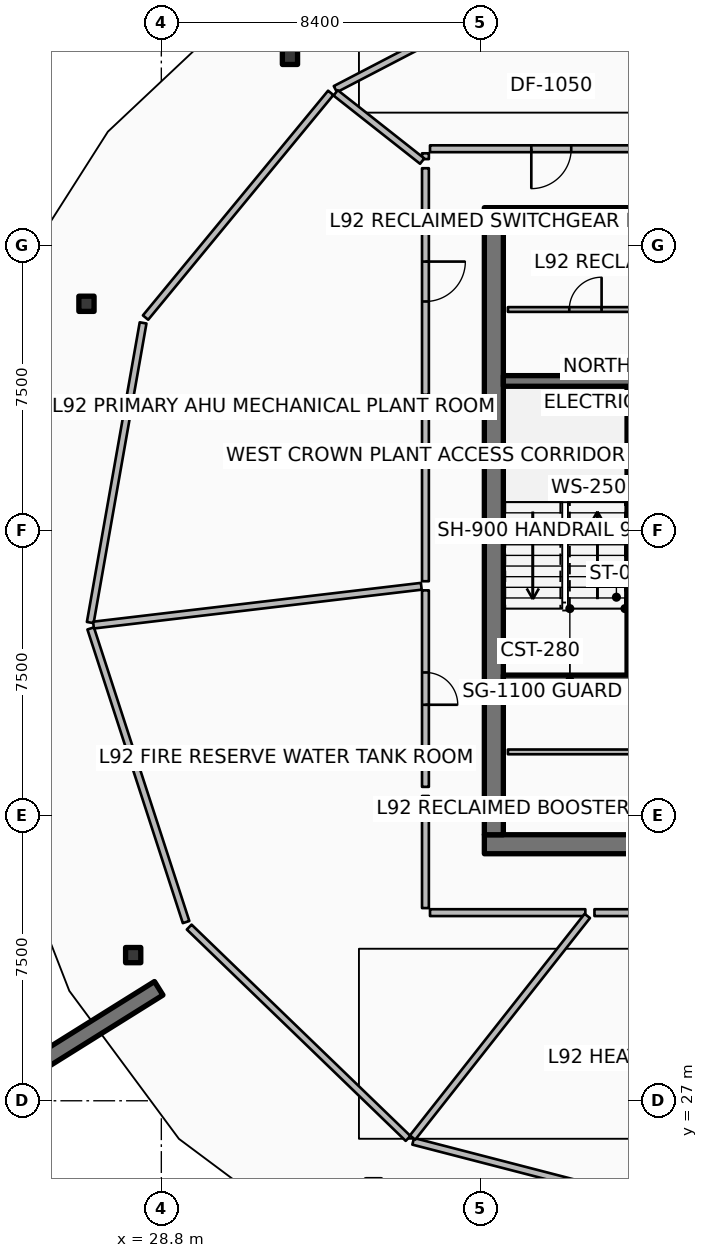
"""IFC4 building model, lengths in metres.
Left out: names, types, materials, properties, quantities, classifications, styles, units other than length and angle.
Written with IfcOpenShell. Run it as: python <this file> out.ifc"""

import sys

from ifc_helpers import new_model, si_unit, direction, frame, frame_2d, origin, origin_2d, place, context, subcontext, project, spatial, rectangle, hollow_rectangle, extrude, element, fill, save


model = new_model("IFC4")
c1 = context("Model", 3, precision=1e-05, world=origin(), true_north=direction((0.0, 1.0)))
c2 = subcontext(c1, "Body", "Model", "MODEL_VIEW")
j1 = project(units=[si_unit("LENGTHUNIT", "METRE"), si_unit("PLANEANGLEUNIT", "RADIAN")], contexts=[c1])
p1 = place(None, origin())
s1 = spatial("IfcSite", under=j1, at=p1, CompositionType="ELEMENT")
p2 = place(p1, origin())
s2 = spatial("IfcBuilding", under=s1, at=p2, CompositionType="ELEMENT")
p3 = place(p2, frame((0.0, 0.0, 366.8)))
s3 = spatial("IfcBuildingStorey", under=s2, at=p3, CompositionType="ELEMENT", Elevation=366.8)
for number, where, z_axis, x_axis in (
    (1, (37.3, 33.75, 0.0), (0.0, 0.0, 1.0), (1.0, 0.0, 0.0)),
    (2, (37.3, 50.25, 0.0), (0.0, 0.0, 1.0), (1.0, 0.0, 0.0)),
):
    element("IfcWall", number, at=place(p3, frame(where, z_axis=z_axis, x_axis=x_axis)), inside=s3, PredefinedType="SHEAR", context=c2, shape_type="SweptSolid", body=[
        extrude(rectangle(XDim=9.6, YDim=0.5, at=frame_2d((4.8, 0.0))), origin(), (0.0, 0.0, 1.0), 3.6),
    ])
p4 = place(p3, frame((37.55, 34.0, 0.0), z_axis=(0.0, 0.0, 1.0), x_axis=(0.0, 1.0, 0.0)))
e3 = element("IfcWall", 3, at=p4, inside=s3, PredefinedType="SHEAR", context=c2, shape_type="SweptSolid", body=[
    extrude(rectangle(XDim=16.0, YDim=0.5, at=frame_2d((8.0, 0.0))), origin(), (0.0, 0.0, 1.0), 3.6),
])
for number, where, z_axis, x_axis in (
    (4, (37.8, 38.06, 0.0), (0.0, 0.0, 1.0), (1.0, 0.0, 0.0)),
    (5, (37.8, 45.94, 0.0), (0.0, 0.0, 1.0), (1.0, 0.0, 0.0)),
):
    element("IfcWall", number, at=place(p3, frame(where, z_axis=z_axis, x_axis=x_axis)), inside=s3, PredefinedType="SHEAR", context=c2, shape_type="SweptSolid", body=[
        extrude(rectangle(XDim=3.5, YDim=0.28, at=frame_2d((1.75, 0.0))), origin(), (0.0, 0.0, 1.0), 3.6),
    ])
p5 = place(p3, frame((28.731, 29.959, 0.0), z_axis=(0.0, 0.0, 1.0), x_axis=(-0.848033572426, -0.529942506352, 0.0)))
e6 = element("IfcWall", 6, at=p5, inside=s3, PredefinedType="SOLIDWALL", context=c2, shape_type="SweptSolid", body=[
    extrude(rectangle(XDim=3.5, YDim=0.42, at=frame_2d((1.75, 0.0))), origin(), (0.0, 0.0, 1.0), 3.6),
])
for number, where, z_axis, x_axis in (
    (7, (32.185, 54.468, 0.0), (0.0, 0.0, 1.0), (1.0, 0.0, 0.0)),
    (8, (26.83, 47.97, 0.0), (0.0, 0.0, 1.0), (1.0, 0.0, 0.0)),
    (9, (28.059, 30.833, 0.0), (0.0, 0.0, 1.0), (1.0, 0.0, 0.0)),
):
    element("IfcColumn", number, at=place(p3, frame(where, z_axis=z_axis, x_axis=x_axis)), inside=s3, PredefinedType="COLUMN", context=c2, shape_type="SweptSolid", body=[
        extrude(hollow_rectangle(XDim=0.4, YDim=0.4, WallThickness=0.02, InnerFilletRadius=0.02, OuterFilletRadius=0.04, at=origin_2d()), origin(), (0.0, 0.0, 1.0), 3.32),
    ])
p6 = place(p3, frame((41.18, 38.22, 0.0), z_axis=(0.0, 0.0, 1.0), x_axis=(0.0, 1.0, 0.0)))
e10 = element("IfcWall", 10, at=p6, inside=s3, PredefinedType="SOLIDWALL", context=c2, shape_type="SweptSolid", body=[
    extrude(rectangle(XDim=7.56, YDim=0.25, at=frame_2d((3.78, 0.0))), origin(), (0.0, 0.0, 1.0), 3.32),
])
p7 = place(p6, frame((0.3, 0.0, 0.0)))
e11 = element("IfcOpeningElement", 11, at=p7, cuts=e10, PredefinedType="OPENING", context=c2, shape_type="SweptSolid", body=[
    extrude(rectangle(XDim=1.55, YDim=2.15, at=frame_2d((0.775, 1.075))), frame((0.0, 0.135, 0.0), z_axis=(0.0, -1.0, 0.0), x_axis=(1.0, 0.0, 0.0)), (0.0, 0.0, 1.0), 0.27),
])
p8 = place(p3, frame((37.92, 36.18, 0.0), z_axis=(0.0, 0.0, 1.0), x_axis=(1.0, 0.0, 0.0)))
e12 = element("IfcWall", 12, at=p8, inside=s3, PredefinedType="PARTITIONING", context=c2, shape_type="SweptSolid", body=[
    extrude(rectangle(XDim=8.8, YDim=0.125, at=frame_2d((4.4, 0.0))), origin(), (0.0, 0.0, 1.0), 2.76),
])
p9 = place(p8, frame((3.975, 0.0, 0.0)))
e13 = element("IfcOpeningElement", 13, at=p9, cuts=e12, PredefinedType="OPENING", context=c2, shape_type="SweptSolid", body=[
    extrude(rectangle(XDim=0.85, YDim=2.06, at=frame_2d((0.425, 1.03))), frame((0.0, 0.073, 0.0), z_axis=(0.0, -1.0, 0.0), x_axis=(1.0, 0.0, 0.0)), (0.0, 0.0, 1.0), 0.145),
])
p10 = place(p3, frame((37.92, 47.82, 0.0), z_axis=(0.0, 0.0, 1.0), x_axis=(1.0, 0.0, 0.0)))
e14 = element("IfcWall", 14, at=p10, inside=s3, PredefinedType="PARTITIONING", context=c2, shape_type="SweptSolid", body=[
    extrude(rectangle(XDim=4.08, YDim=0.125, at=frame_2d((2.04, 0.0))), origin(), (0.0, 0.0, 1.0), 2.76),
])
p11 = place(p10, frame((1.615, 0.0, 0.0)))
e15 = element("IfcOpeningElement", 15, at=p11, cuts=e14, PredefinedType="OPENING", context=c2, shape_type="SweptSolid", body=[
    extrude(rectangle(XDim=0.85, YDim=2.06, at=frame_2d((0.425, 1.03))), frame((0.0, 0.073, 0.0), z_axis=(0.0, -1.0, 0.0), x_axis=(1.0, 0.0, 0.0)), (0.0, 0.0, 1.0), 0.145),
])
p12 = place(p3, frame((39.59, 56.853, 0.0), z_axis=(0.0, 0.0, 1.0), x_axis=(-0.886949494865, -0.461866423935, 0.0)))
e16 = element("IfcWall", 16, at=p12, inside=s3, PredefinedType="PARTITIONING", context=c2, shape_type="SweptSolid", body=[
    extrude(rectangle(XDim=7.002, YDim=0.18, at=frame_2d((3.501, 0.0))), origin(), (0.0, 0.0, 1.0), 2.76),
])
p13 = place(p3, frame((33.258, 53.52, 0.0), z_axis=(0.0, 0.0, 1.0), x_axis=(-0.636018833443, -0.771673534278, 0.0)))
e17 = element("IfcWall", 17, at=p13, inside=s3, PredefinedType="PARTITIONING", context=c2, shape_type="SweptSolid", body=[
    extrude(rectangle(XDim=7.661, YDim=0.18, at=frame_2d((3.831, 0.0))), origin(), (0.0, 0.0, 1.0), 2.76),
])
p14 = place(p3, frame((28.32, 47.468, 0.0), z_axis=(0.0, 0.0, 1.0), x_axis=(-0.173668776466, -0.984804120666, 0.0)))
e18 = element("IfcWall", 18, at=p14, inside=s3, PredefinedType="PARTITIONING", context=c2, shape_type="SweptSolid", body=[
    extrude(rectangle(XDim=8.006, YDim=0.18, at=frame_2d((4.003, 0.0))), origin(), (0.0, 0.0, 1.0), 2.76),
])
p15 = place(p3, frame((26.941, 39.428, 0.0), z_axis=(0.0, 0.0, 1.0), x_axis=(0.309024234991, -0.951054163646, 0.0)))
e19 = element("IfcWall", 19, at=p15, inside=s3, PredefinedType="PARTITIONING", context=c2, shape_type="SweptSolid", body=[
    extrude(rectangle(XDim=8.124, YDim=0.18, at=frame_2d((4.062, 0.0))), origin(), (0.0, 0.0, 1.0), 2.76),
])
p16 = place(p3, frame((29.533, 31.57, 0.0), z_axis=(0.0, 0.0, 1.0), x_axis=(0.719364153135, -0.694633151516, 0.0)))
e20 = element("IfcWall", 20, at=p16, inside=s3, PredefinedType="PARTITIONING", context=c2, shape_type="SweptSolid", body=[
    extrude(rectangle(XDim=8.006, YDim=0.18, at=frame_2d((4.003, 0.0))), origin(), (0.0, 0.0, 1.0), 2.76),
])
p17 = place(p3, frame((35.427, 25.934, 0.0), z_axis=(0.0, 0.0, 1.0), x_axis=(0.968117205342, -0.250497658115, 0.0)))
e21 = element("IfcWall", 21, at=p17, inside=s3, PredefinedType="PARTITIONING", context=c2, shape_type="SweptSolid", body=[
    extrude(rectangle(XDim=7.662, YDim=0.18, at=frame_2d((3.831, 0.0))), origin(), (0.0, 0.0, 1.0), 2.76),
])
p18 = place(p3, frame((42.252, 52.05, 0.0), z_axis=(0.0, 0.0, 1.0), x_axis=(-1.0, 0.0, 0.0)))
e22 = element("IfcWall", 22, at=p18, inside=s3, PredefinedType="PARTITIONING", context=c2, shape_type="SweptSolid", body=[
    extrude(rectangle(XDim=6.382, YDim=0.18, at=frame_2d((3.191, 0.0))), origin(), (0.0, 0.0, 1.0), 2.76),
])
p19 = place(p18, frame((2.666, 0.0, 0.0)))
e23 = element("IfcOpeningElement", 23, at=p19, cuts=e22, PredefinedType="OPENING", context=c2, shape_type="SweptSolid", body=[
    extrude(rectangle(XDim=1.05, YDim=2.1, at=frame_2d((0.525, 1.05))), frame((0.0, 0.1, 0.0), z_axis=(0.0, -1.0, 0.0), x_axis=(1.0, 0.0, 0.0)), (0.0, 0.0, 1.0), 0.2),
])
p20 = place(p3, frame((35.75, 51.93, 0.0), z_axis=(0.0, 0.0, 1.0), x_axis=(0.0, -1.0, 0.0)))
e24 = element("IfcWall", 24, at=p20, inside=s3, PredefinedType="PARTITIONING", context=c2, shape_type="SweptSolid", body=[
    extrude(rectangle(XDim=0.153, YDim=0.18, at=frame_2d((0.076, 0.0))), origin(), (0.0, 0.0, 1.0), 2.76),
])
p21 = place(p3, frame((35.664, 51.725, 0.0), z_axis=(0.0, 0.0, 1.0), x_axis=(-0.78528570066, 0.619133562601, 0.0)))
e25 = element("IfcWall", 25, at=p21, inside=s3, PredefinedType="PARTITIONING", context=c2, shape_type="SweptSolid", body=[
    extrude(rectangle(XDim=2.899, YDim=0.18, at=frame_2d((1.45, 0.0))), origin(), (0.0, 0.0, 1.0), 2.76),
])
p22 = place(p3, frame((35.75, 51.537, 0.0), z_axis=(0.0, 0.0, 1.0), x_axis=(0.0, -1.0, 0.0)))
e26 = element("IfcWall", 26, at=p22, inside=s3, PredefinedType="PARTITIONING", context=c2, shape_type="SweptSolid", body=[
    extrude(rectangle(XDim=5.962, YDim=0.18, at=frame_2d((2.981, 0.0))), origin(), (0.0, 0.0, 1.0), 2.76),
])
p23 = place(p22, frame((2.456, 0.0, 0.0)))
e27 = element("IfcOpeningElement", 27, at=p23, cuts=e26, PredefinedType="OPENING", context=c2, shape_type="SweptSolid", body=[
    extrude(rectangle(XDim=1.05, YDim=2.1, at=frame_2d((0.525, 1.05))), frame((0.0, 0.1, 0.0), z_axis=(0.0, -1.0, 0.0), x_axis=(1.0, 0.0, 0.0)), (0.0, 0.0, 1.0), 0.2),
])
p24 = place(p3, frame((35.75, 45.335, 0.0), z_axis=(0.0, 0.0, 1.0), x_axis=(0.0, -1.0, 0.0)))
e28 = element("IfcWall", 28, at=p24, inside=s3, PredefinedType="PARTITIONING", context=c2, shape_type="SweptSolid", body=[
    extrude(rectangle(XDim=4.665, YDim=0.18, at=frame_2d((2.333, 0.0))), origin(), (0.0, 0.0, 1.0), 2.76),
])
p25 = place(p3, frame((35.641, 40.537, 0.0), z_axis=(0.0, 0.0, 1.0), x_axis=(-0.993070751419, -0.117518010011, 0.0)))
e29 = element("IfcWall", 29, at=p25, inside=s3, PredefinedType="PARTITIONING", context=c2, shape_type="SweptSolid", body=[
    extrude(rectangle(XDim=8.686, YDim=0.18, at=frame_2d((4.343, 0.0))), origin(), (0.0, 0.0, 1.0), 2.76),
])
p26 = place(p3, frame((35.75, 40.43, 0.0), z_axis=(0.0, 0.0, 1.0), x_axis=(0.0, -1.0, 0.0)))
e30 = element("IfcWall", 30, at=p26, inside=s3, PredefinedType="PARTITIONING", context=c2, shape_type="SweptSolid", body=[
    extrude(rectangle(XDim=5.17, YDim=0.18, at=frame_2d((2.585, 0.0))), origin(), (0.0, 0.0, 1.0), 2.76),
])
p27 = place(p26, frame((2.16, 0.0, 0.0)))
e31 = element("IfcOpeningElement", 31, at=p27, cuts=e30, PredefinedType="OPENING", context=c2, shape_type="SweptSolid", body=[
    extrude(rectangle(XDim=0.85, YDim=2.06, at=frame_2d((0.425, 1.03))), frame((0.0, 0.1, 0.0), z_axis=(0.0, -1.0, 0.0), x_axis=(1.0, 0.0, 0.0)), (0.0, 0.0, 1.0), 0.2),
])
p28 = place(p3, frame((35.75, 35.02, 0.0), z_axis=(0.0, 0.0, 1.0), x_axis=(0.0, -1.0, 0.0)))
e32 = element("IfcWall", 32, at=p28, inside=s3, PredefinedType="PARTITIONING", context=c2, shape_type="SweptSolid", body=[
    extrude(rectangle(XDim=2.95, YDim=0.18, at=frame_2d((1.475, 0.0))), origin(), (0.0, 0.0, 1.0), 2.76),
])
p29 = place(p3, frame((35.87, 31.95, 0.0), z_axis=(0.0, 0.0, 1.0), x_axis=(1.0, 0.0, 0.0)))
e33 = element("IfcWall", 33, at=p29, inside=s3, PredefinedType="PARTITIONING", context=c2, shape_type="SweptSolid", body=[
    extrude(rectangle(XDim=4.087, YDim=0.18, at=frame_2d((2.043, 0.0))), origin(), (0.0, 0.0, 1.0), 2.76),
])
p30 = place(p3, frame((40.009, 31.864, 0.0), z_axis=(0.0, 0.0, 1.0), x_axis=(-0.619089811342, -0.785320192974, 0.0)))
e34 = element("IfcWall", 34, at=p30, inside=s3, PredefinedType="PARTITIONING", context=c2, shape_type="SweptSolid", body=[
    extrude(rectangle(XDim=7.426, YDim=0.18, at=frame_2d((3.713, 0.0))), origin(), (0.0, 0.0, 1.0), 2.76),
])
p31 = place(p3, frame((40.197, 31.95, 0.0), z_axis=(0.0, 0.0, 1.0), x_axis=(1.0, 0.0, 0.0)))
e35 = element("IfcWall", 35, at=p31, inside=s3, PredefinedType="PARTITIONING", context=c2, shape_type="SweptSolid", body=[
    extrude(rectangle(XDim=4.848, YDim=0.18, at=frame_2d((2.424, 0.0))), origin(), (0.0, 0.0, 1.0), 2.76),
])
p32 = place(p31, frame((1.899, 0.0, 0.0)))
e36 = element("IfcOpeningElement", 36, at=p32, cuts=e35, PredefinedType="OPENING", context=c2, shape_type="SweptSolid", body=[
    extrude(rectangle(XDim=1.05, YDim=2.1, at=frame_2d((0.525, 1.05))), frame((0.0, 0.1, 0.0), z_axis=(0.0, -1.0, 0.0), x_axis=(1.0, 0.0, 0.0)), (0.0, 0.0, 1.0), 0.2),
])
p33 = place(p11, origin())
e37 = element("IfcDoor", 37, at=p33, inside=s3, OperationType="SINGLE_SWING_RIGHT", PredefinedType="DOOR", context=c2, shape_type="SweptSolid", body=[
    extrude(rectangle(XDim=0.85, YDim=2.06, at=frame_2d((0.425, 1.03))), frame((0.0, 0.025, 0.0), z_axis=(0.0, -1.0, 0.0), x_axis=(1.0, 0.0, 0.0)), (0.0, 0.0, 1.0), 0.05),
])
fill(e15, e37)
p34 = place(p19, origin())
e38 = element("IfcDoor", 38, at=p34, inside=s3, OperationType="SINGLE_SWING_RIGHT", PredefinedType="DOOR", context=c2, shape_type="SweptSolid", body=[
    extrude(rectangle(XDim=1.05, YDim=2.1, at=frame_2d((0.525, 1.05))), frame((0.0, 0.025, 0.0), z_axis=(0.0, -1.0, 0.0), x_axis=(1.0, 0.0, 0.0)), (0.0, 0.0, 1.0), 0.05),
])
fill(e23, e38)
p35 = place(p23, origin())
e39 = element("IfcDoor", 39, at=p35, inside=s3, OperationType="SINGLE_SWING_LEFT", PredefinedType="DOOR", context=c2, shape_type="SweptSolid", body=[
    extrude(rectangle(XDim=1.05, YDim=2.1, at=frame_2d((0.525, 1.05))), frame((0.0, 0.025, 0.0), z_axis=(0.0, -1.0, 0.0), x_axis=(1.0, 0.0, 0.0)), (0.0, 0.0, 1.0), 0.05),
])
fill(e27, e39)
p36 = place(p27, origin())
e40 = element("IfcDoor", 40, at=p36, inside=s3, OperationType="SINGLE_SWING_RIGHT", PredefinedType="DOOR", context=c2, shape_type="SweptSolid", body=[
    extrude(rectangle(XDim=0.85, YDim=2.06, at=frame_2d((0.425, 1.03))), frame((0.0, 0.025, 0.0), z_axis=(0.0, -1.0, 0.0), x_axis=(1.0, 0.0, 0.0)), (0.0, 0.0, 1.0), 0.05),
])
fill(e31, e40)
save(model, sys.argv[1])
